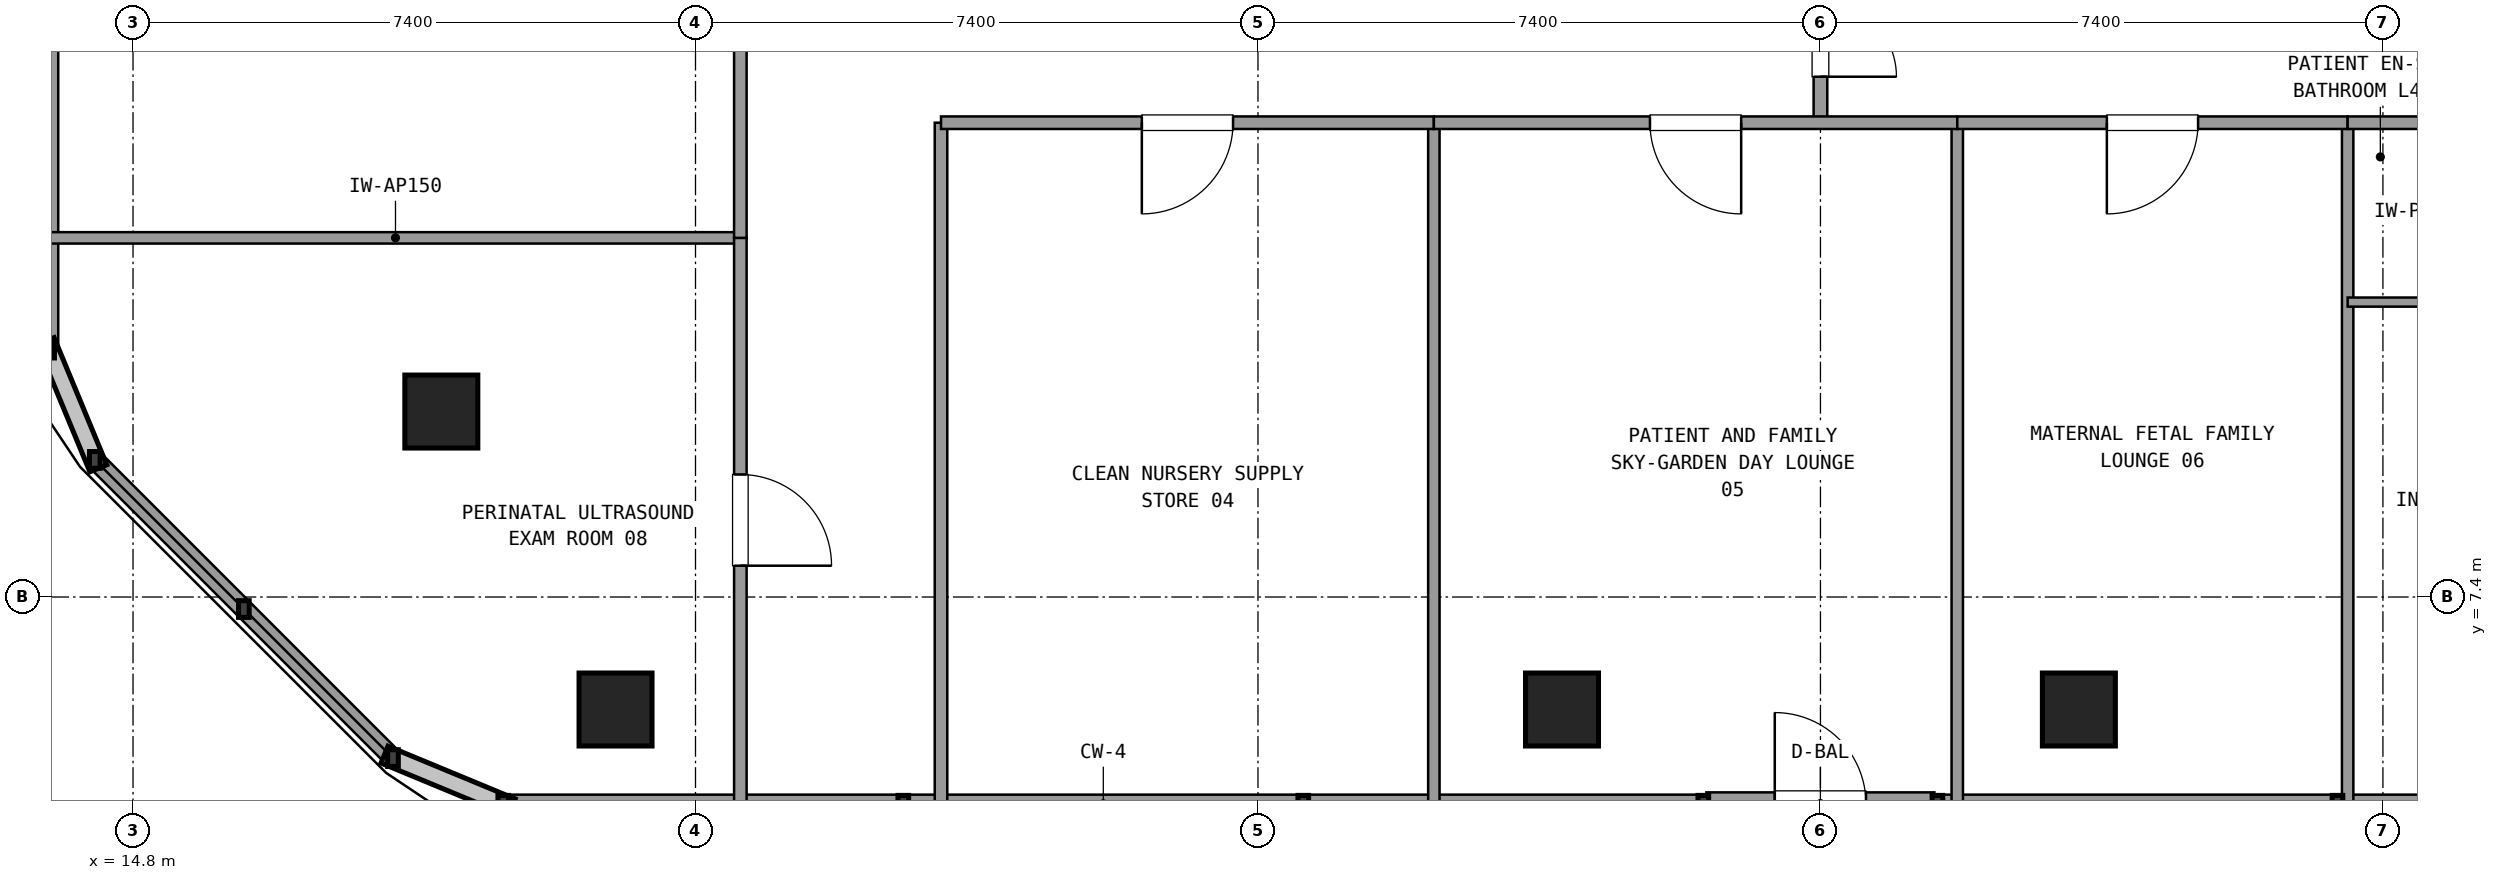
"""IFC4 building model, lengths in metres.
Left out: names, types, materials, properties, quantities, classifications, styles, units other than length and angle.
Written with IfcOpenShell. Run it as: python <this file> out.ifc"""

import sys

from ifc_helpers import new_model, si_unit, direction, frame, frame_2d, origin, origin_2d, place, context, subcontext, project, spatial, rectangle, extrude, element, fill, save


model = new_model("IFC4")
c1 = context("Model", 3, precision=1e-05, world=origin(), true_north=direction((0.0, 1.0)))
c2 = subcontext(c1, "Body", "Model", "MODEL_VIEW")
j1 = project(units=[si_unit("LENGTHUNIT", "METRE"), si_unit("PLANEANGLEUNIT", "RADIAN")], contexts=[c1])
p1 = place(None, origin())
s1 = spatial("IfcSite", under=j1, at=p1, CompositionType="ELEMENT")
p2 = place(p1, origin())
s2 = spatial("IfcBuilding", under=s1, at=p2, CompositionType="ELEMENT")
p3 = place(p2, frame((0.0, 0.0, 163.62)))
s3 = spatial("IfcBuildingStorey", under=s2, at=p3, CompositionType="ELEMENT", Elevation=163.62)
for number, where, z_axis, x_axis in (
    (1, (18.856, 9.84, 0.0), (0.0, 0.0, 1.0), (1.0, 0.0, 0.0)),
    (2, (21.148, 5.92, 0.0), (0.0, 0.0, 1.0), (1.0, 0.0, 0.0)),
    (3, (33.6, 5.92, 0.0), (0.0, 0.0, 1.0), (1.0, 0.0, 0.0)),
    (4, (40.4, 5.92, 0.0), (0.0, 0.0, 1.0), (1.0, 0.0, 0.0)),
):
    element("IfcColumn", number, at=place(p3, frame(where, z_axis=z_axis, x_axis=x_axis)), inside=s3, PredefinedType="COLUMN", context=c2, shape_type="SweptSolid", body=[
        extrude(rectangle(XDim=0.96, YDim=0.96, at=origin_2d()), origin(), (0.0, 0.0, 1.0), 3.6),
    ])
p4 = place(p3, frame((35.499, 4.68, 0.0), z_axis=(0.0, 0.0, 1.0), x_axis=(1.0, 0.0, 0.0)))
e5 = element("IfcWall", 5, at=p4, inside=s3, PredefinedType="SOLIDWALL", context=c2, shape_type="SweptSolid", body=[
    extrude(rectangle(XDim=3.0, YDim=0.3, at=frame_2d((1.5, 0.0))), origin(), (0.0, 0.0, 1.0), 2.67),
])
p5 = place(p4, frame((0.9, 0.0, 0.0)))
e6 = element("IfcOpeningElement", 6, at=p5, cuts=e5, PredefinedType="OPENING", context=c2, shape_type="SweptSolid", body=[
    extrude(rectangle(XDim=1.2, YDim=2.2, at=frame_2d((0.6, 1.1))), frame((0.0, 0.16, 0.0), z_axis=(0.0, -1.0, 0.0), x_axis=(1.0, 0.0, 0.0)), (0.0, 0.0, 1.0), 0.32),
])
p6 = place(p3, frame((19.671, 4.68, 0.0), z_axis=(0.0, 0.0, 1.0), x_axis=(1.0, 0.0, 0.0)))
e7 = element("IfcWall", 7, at=p6, inside=s3, PredefinedType="SOLIDWALL", context=c2, shape_type="SweptSolid", body=[
    extrude(rectangle(XDim=15.788, YDim=0.24, at=frame_2d((7.894, 0.0))), origin(), (0.0, 0.0, 1.0), 0.85),
])
p7 = place(p3, frame((38.539, 4.68, 0.0), z_axis=(0.0, 0.0, 1.0), x_axis=(1.0, 0.0, 0.0)))
e8 = element("IfcWall", 8, at=p7, inside=s3, PredefinedType="SOLIDWALL", context=c2, shape_type="SweptSolid", body=[
    extrude(rectangle(XDim=15.79, YDim=0.24, at=frame_2d((7.895, 0.0))), origin(), (0.0, 0.0, 1.0), 0.85),
])
p8 = place(p3, frame((13.696, 24.36, 0.0), z_axis=(0.0, 0.0, 1.0), x_axis=(0.0, -1.0, 0.0)))
e9 = element("IfcWall", 9, at=p8, inside=s3, PredefinedType="SOLIDWALL", context=c2, shape_type="SweptSolid", body=[
    extrude(rectangle(XDim=13.705, YDim=0.24, at=frame_2d((6.853, 0.0))), origin(), (0.0, 0.0, 1.0), 0.85),
])
p9 = place(p3, frame((14.297, 9.204, 0.0), z_axis=(0.0, 0.0, 1.0), x_axis=(0.707084777957, -0.707128783731, 0.0)))
e10 = element("IfcWall", 10, at=p9, inside=s3, PredefinedType="SOLIDWALL", context=c2, shape_type="SweptSolid", body=[
    extrude(rectangle(XDim=5.548, YDim=0.24, at=frame_2d((2.774, 0.0))), origin(), (0.0, 0.0, 1.0), 0.85),
])
p10 = place(p3, frame((37.0, 13.64, 0.0), z_axis=(0.0, 0.0, 1.0), x_axis=(0.0, 1.0, 0.0)))
e11 = element("IfcWall", 11, at=p10, inside=s3, PredefinedType="PARTITIONING", context=c2, shape_type="SweptSolid", body=[
    extrude(rectangle(XDim=3.21, YDim=0.18, at=frame_2d((1.605, 0.0))), origin(), (0.0, 0.0, 1.0), 2.61),
])
p11 = place(p10, frame((0.605, 0.0, 0.0)))
e12 = element("IfcOpeningElement", 12, at=p11, cuts=e11, PredefinedType="OPENING", context=c2, shape_type="SweptSolid", body=[
    extrude(rectangle(XDim=2.0, YDim=2.2, at=frame_2d((1.0, 1.1))), frame((0.0, 0.1, 0.0), z_axis=(0.0, -1.0, 0.0), x_axis=(1.0, 0.0, 0.0)), (0.0, 0.0, 1.0), 0.2),
])
p12 = place(p3, frame((25.43, 4.7, 0.0), z_axis=(0.0, 0.0, 1.0), x_axis=(0.0, 1.0, 0.0)))
e13 = element("IfcWall", 13, at=p12, inside=s3, PredefinedType="PARTITIONING", context=c2, shape_type="SweptSolid", body=[
    extrude(rectangle(XDim=8.94, YDim=0.165, at=frame_2d((4.47, 0.0))), origin(), (0.0, 0.0, 1.0), 2.61),
])
p13 = place(p3, frame((31.914, 13.64, 0.0), z_axis=(0.0, 0.0, 1.0), x_axis=(0.0, -1.0, 0.0)))
e14 = element("IfcWall", 14, at=p13, inside=s3, PredefinedType="PARTITIONING", context=c2, shape_type="SweptSolid", body=[
    extrude(rectangle(XDim=8.94, YDim=0.15, at=frame_2d((4.47, 0.0))), origin(), (0.0, 0.0, 1.0), 2.61),
])
p14 = place(p3, frame((25.43, 13.64, 0.0), z_axis=(0.0, 0.0, 1.0), x_axis=(1.0, 0.0, 0.0)))
e15 = element("IfcWall", 15, at=p14, inside=s3, PredefinedType="PARTITIONING", context=c2, shape_type="SweptSolid", body=[
    extrude(rectangle(XDim=6.484, YDim=0.165, at=frame_2d((3.242, 0.0))), origin(), (0.0, 0.0, 1.0), 2.61),
])
p15 = place(p14, frame((2.642, 0.0, 0.0)))
e16 = element("IfcOpeningElement", 16, at=p15, cuts=e15, PredefinedType="OPENING", context=c2, shape_type="SweptSolid", body=[
    extrude(rectangle(XDim=1.2, YDim=2.15, at=frame_2d((0.6, 1.075))), frame((0.0, 0.093, 0.0), z_axis=(0.0, -1.0, 0.0), x_axis=(1.0, 0.0, 0.0)), (0.0, 0.0, 1.0), 0.185),
])
p16 = place(p3, frame((38.8, 13.64, 0.0), z_axis=(0.0, 0.0, 1.0), x_axis=(0.0, -1.0, 0.0)))
e17 = element("IfcWall", 17, at=p16, inside=s3, PredefinedType="PARTITIONING", context=c2, shape_type="SweptSolid", body=[
    extrude(rectangle(XDim=8.94, YDim=0.15, at=frame_2d((4.47, 0.0))), origin(), (0.0, 0.0, 1.0), 2.61),
])
p17 = place(p3, frame((31.914, 13.64, 0.0), z_axis=(0.0, 0.0, 1.0), x_axis=(1.0, 0.0, 0.0)))
e18 = element("IfcWall", 18, at=p17, inside=s3, PredefinedType="PARTITIONING", context=c2, shape_type="SweptSolid", body=[
    extrude(rectangle(XDim=6.886, YDim=0.165, at=frame_2d((3.443, 0.0))), origin(), (0.0, 0.0, 1.0), 2.61),
])
p18 = place(p17, frame((2.843, 0.0, 0.0)))
e19 = element("IfcOpeningElement", 19, at=p18, cuts=e18, PredefinedType="OPENING", context=c2, shape_type="SweptSolid", body=[
    extrude(rectangle(XDim=1.2, YDim=2.15, at=frame_2d((0.6, 1.075))), frame((0.0, 0.093, 0.0), z_axis=(0.0, -1.0, 0.0), x_axis=(1.0, 0.0, 0.0)), (0.0, 0.0, 1.0), 0.185),
])
p19 = place(p3, frame((43.936, 13.64, 0.0), z_axis=(0.0, 0.0, 1.0), x_axis=(0.0, -1.0, 0.0)))
e20 = element("IfcWall", 20, at=p19, inside=s3, PredefinedType="PARTITIONING", context=c2, shape_type="SweptSolid", body=[
    extrude(rectangle(XDim=8.94, YDim=0.15, at=frame_2d((4.47, 0.0))), origin(), (0.0, 0.0, 1.0), 2.61),
])
p20 = place(p3, frame((38.8, 13.64, 0.0), z_axis=(0.0, 0.0, 1.0), x_axis=(1.0, 0.0, 0.0)))
e21 = element("IfcWall", 21, at=p20, inside=s3, PredefinedType="PARTITIONING", context=c2, shape_type="SweptSolid", body=[
    extrude(rectangle(XDim=5.136, YDim=0.165, at=frame_2d((2.568, 0.0))), origin(), (0.0, 0.0, 1.0), 2.61),
])
p21 = place(p20, frame((1.968, 0.0, 0.0)))
e22 = element("IfcOpeningElement", 22, at=p21, cuts=e21, PredefinedType="OPENING", context=c2, shape_type="SweptSolid", body=[
    extrude(rectangle(XDim=1.2, YDim=2.15, at=frame_2d((0.6, 1.075))), frame((0.0, 0.093, 0.0), z_axis=(0.0, -1.0, 0.0), x_axis=(1.0, 0.0, 0.0)), (0.0, 0.0, 1.0), 0.185),
])
p22 = place(p3, frame((43.936, 13.64, 0.0), z_axis=(0.0, 0.0, 1.0), x_axis=(1.0, 0.0, 0.0)))
e23 = element("IfcWall", 23, at=p22, inside=s3, PredefinedType="PARTITIONING", context=c2, shape_type="SweptSolid", body=[
    extrude(rectangle(XDim=4.634, YDim=0.165, at=frame_2d((2.317, 0.0))), origin(), (0.0, 0.0, 1.0), 2.61),
])
p23 = place(p22, frame((2.81, 0.0, 0.0)))
e24 = element("IfcOpeningElement", 24, at=p23, cuts=e23, PredefinedType="OPENING", context=c2, shape_type="SweptSolid", body=[
    extrude(rectangle(XDim=1.35, YDim=2.15, at=frame_2d((0.675, 1.075))), frame((0.0, 0.093, 0.0), z_axis=(0.0, -1.0, 0.0), x_axis=(1.0, 0.0, 0.0)), (0.0, 0.0, 1.0), 0.185),
])
p24 = place(p3, frame((43.936, 11.28, 0.0), z_axis=(0.0, 0.0, 1.0), x_axis=(1.0, 0.0, 0.0)))
e25 = element("IfcWall", 25, at=p24, inside=s3, PredefinedType="PLUMBINGWALL", context=c2, shape_type="SweptSolid", body=[
    extrude(rectangle(XDim=2.14, YDim=0.12, at=frame_2d((1.07, 0.0))), origin(), (0.0, 0.0, 1.0), 2.61),
])
p25 = place(p3, frame((22.79, 12.125, 0.0), z_axis=(0.0, 0.0, 1.0), x_axis=(-1.0, 0.0, 0.0)))
e26 = element("IfcWall", 26, at=p25, inside=s3, PredefinedType="PARTITIONING", context=c2, shape_type="SweptSolid", body=[
    extrude(rectangle(XDim=9.074, YDim=0.15, at=frame_2d((4.537, 0.0))), origin(), (0.0, 0.0, 1.0), 2.61),
])
p26 = place(p3, frame((22.79, 4.7, 0.0), z_axis=(0.0, 0.0, 1.0), x_axis=(0.0, 1.0, 0.0)))
e27 = element("IfcWall", 27, at=p26, inside=s3, PredefinedType="PARTITIONING", context=c2, shape_type="SweptSolid", body=[
    extrude(rectangle(XDim=7.425, YDim=0.165, at=frame_2d((3.712, 0.0))), origin(), (0.0, 0.0, 1.0), 2.61),
])
p27 = place(p26, frame((3.112, 0.0, 0.0)))
e28 = element("IfcOpeningElement", 28, at=p27, cuts=e27, PredefinedType="OPENING", context=c2, shape_type="SweptSolid", body=[
    extrude(rectangle(XDim=1.2, YDim=2.15, at=frame_2d((0.6, 1.075))), frame((0.0, 0.093, 0.0), z_axis=(0.0, -1.0, 0.0), x_axis=(1.0, 0.0, 0.0)), (0.0, 0.0, 1.0), 0.185),
])
p28 = place(p3, frame((22.79, 12.125, 0.0), z_axis=(0.0, 0.0, 1.0), x_axis=(0.0, 1.0, 0.0)))
e29 = element("IfcWall", 29, at=p28, inside=s3, PredefinedType="PARTITIONING", context=c2, shape_type="SweptSolid", body=[
    extrude(rectangle(XDim=12.115, YDim=0.165, at=frame_2d((6.058, 0.0))), origin(), (0.0, 0.0, 1.0), 2.61),
])
p29 = place(p28, frame((5.457, 0.0, 0.0)))
e30 = element("IfcOpeningElement", 30, at=p29, cuts=e29, PredefinedType="OPENING", context=c2, shape_type="SweptSolid", body=[
    extrude(rectangle(XDim=1.2, YDim=2.15, at=frame_2d((0.6, 1.075))), frame((0.0, 0.093, 0.0), z_axis=(0.0, -1.0, 0.0), x_axis=(1.0, 0.0, 0.0)), (0.0, 0.0, 1.0), 0.185),
])
p30 = place(p11, frame((2.0, 0.0, 0.0), z_axis=(0.0, 0.0, 1.0), x_axis=(-1.0, 0.0, 0.0)))
e31 = element("IfcDoor", 31, at=p30, inside=s3, OperationType="DOUBLE_DOOR_SINGLE_SWING", PredefinedType="DOOR", context=c2, shape_type="SweptSolid", body=[
    extrude(rectangle(XDim=2.0, YDim=2.2, at=frame_2d((1.0, 1.1))), frame((0.0, 0.025, 0.0), z_axis=(0.0, -1.0, 0.0), x_axis=(1.0, 0.0, 0.0)), (0.0, 0.0, 1.0), 0.05),
])
fill(e12, e31)
p31 = place(p15, frame((1.2, 0.0, 0.0), z_axis=(0.0, 0.0, 1.0), x_axis=(-1.0, 0.0, 0.0)))
e32 = element("IfcDoor", 32, at=p31, inside=s3, OperationType="SINGLE_SWING_LEFT", PredefinedType="DOOR", context=c2, shape_type="SweptSolid", body=[
    extrude(rectangle(XDim=1.2, YDim=2.15, at=frame_2d((0.6, 1.075))), frame((0.0, 0.025, 0.0), z_axis=(0.0, -1.0, 0.0), x_axis=(1.0, 0.0, 0.0)), (0.0, 0.0, 1.0), 0.05),
])
fill(e16, e32)
p32 = place(p18, frame((1.2, 0.0, 0.0), z_axis=(0.0, 0.0, 1.0), x_axis=(-1.0, 0.0, 0.0)))
e33 = element("IfcDoor", 33, at=p32, inside=s3, OperationType="SINGLE_SWING_RIGHT", PredefinedType="DOOR", context=c2, shape_type="SweptSolid", body=[
    extrude(rectangle(XDim=1.2, YDim=2.15, at=frame_2d((0.6, 1.075))), frame((0.0, 0.025, 0.0), z_axis=(0.0, -1.0, 0.0), x_axis=(1.0, 0.0, 0.0)), (0.0, 0.0, 1.0), 0.05),
])
fill(e19, e33)
p33 = place(p21, frame((1.2, 0.0, 0.0), z_axis=(0.0, 0.0, 1.0), x_axis=(-1.0, 0.0, 0.0)))
e34 = element("IfcDoor", 34, at=p33, inside=s3, OperationType="SINGLE_SWING_LEFT", PredefinedType="DOOR", context=c2, shape_type="SweptSolid", body=[
    extrude(rectangle(XDim=1.2, YDim=2.15, at=frame_2d((0.6, 1.075))), frame((0.0, 0.025, 0.0), z_axis=(0.0, -1.0, 0.0), x_axis=(1.0, 0.0, 0.0)), (0.0, 0.0, 1.0), 0.05),
])
fill(e22, e34)
p34 = place(p27, frame((1.2, 0.0, 0.0), z_axis=(0.0, 0.0, 1.0), x_axis=(-1.0, 0.0, 0.0)))
e35 = element("IfcDoor", 35, at=p34, inside=s3, OperationType="SINGLE_SWING_LEFT", PredefinedType="DOOR", context=c2, shape_type="SweptSolid", body=[
    extrude(rectangle(XDim=1.2, YDim=2.15, at=frame_2d((0.6, 1.075))), frame((0.0, 0.025, 0.0), z_axis=(0.0, -1.0, 0.0), x_axis=(1.0, 0.0, 0.0)), (0.0, 0.0, 1.0), 0.05),
])
fill(e28, e35)
save(model, sys.argv[1])
